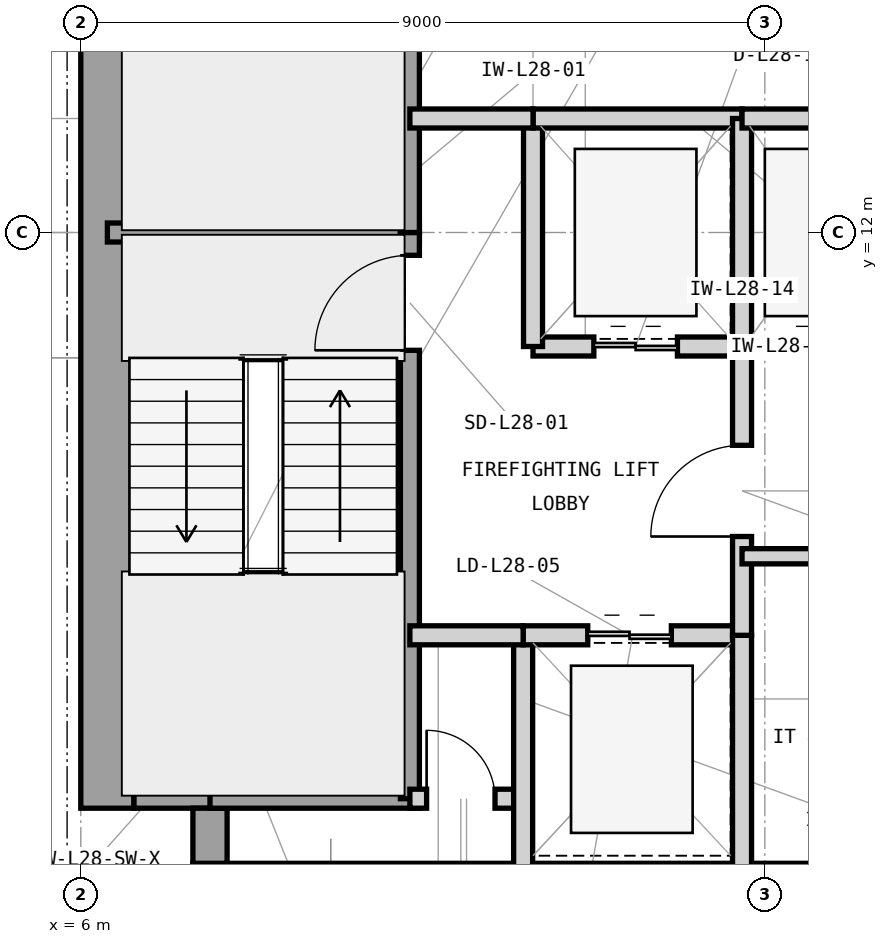
"""IFC4 building model, lengths in metres.
Left out: names, types, materials, properties, quantities, classifications, styles, units other than length and angle.
Written with IfcOpenShell. Run it as: python <this file> out.ifc"""

import sys

from ifc_helpers import new_model, si_unit, direction, frame, frame_2d, origin, place, context, subcontext, project, spatial, rectangle, extrude, element, fill, save


model = new_model("IFC4")
c1 = context("Model", 3, precision=1e-05, world=origin(), true_north=direction((0.0, 1.0)))
c2 = subcontext(c1, "Body", "Model", "MODEL_VIEW")
j1 = project(units=[si_unit("LENGTHUNIT", "METRE"), si_unit("PLANEANGLEUNIT", "RADIAN")], contexts=[c1])
p1 = place(None, origin())
s1 = spatial("IfcSite", under=j1, at=p1, CompositionType="ELEMENT")
p2 = place(p1, origin())
s2 = spatial("IfcBuilding", under=s1, at=p2, CompositionType="ELEMENT")
p3 = place(p2, frame((0.0, 0.0, 120.6)))
s3 = spatial("IfcBuildingStorey", under=s2, at=p3, CompositionType="ELEMENT", Elevation=120.6)
p4 = place(p3, frame((7.475, 3.35, 0.0), z_axis=(0.0, 0.0, 1.0), x_axis=(1.0, 0.0, 0.0)))
e1 = element("IfcWall", 1, at=p4, inside=s3, PredefinedType="SHEAR", context=c2, shape_type="SweptSolid", body=[
    extrude(rectangle(XDim=16.525, YDim=0.7, at=frame_2d((8.262, 0.0))), origin(), (0.0, 0.0, 1.0), 3.9),
])
p5 = place(p3, frame((6.35, 4.425, 0.0), z_axis=(0.0, 0.0, 1.0), x_axis=(0.0, 1.0, 0.0)))
e2 = element("IfcWall", 2, at=p5, inside=s3, PredefinedType="SHEAR", context=c2, shape_type="SweptSolid", body=[
    extrude(rectangle(XDim=15.15, YDim=0.7, at=frame_2d((7.575, 0.0))), origin(), (0.0, 0.0, 1.0), 3.9),
])
p6 = place(p3, frame((6.7, 4.65, 0.0), z_axis=(0.0, 0.0, 1.0), x_axis=(1.0, 0.0, 0.0)))
e3 = element("IfcWall", 3, at=p6, inside=s3, PredefinedType="SHEAR", context=c2, shape_type="SweptSolid", body=[
    extrude(rectangle(XDim=1.225, YDim=0.45, at=frame_2d((0.613, 0.0))), origin(), (0.0, 0.0, 1.0), 3.9),
])
p7 = place(p3, frame((7.7, 3.7, 0.0), z_axis=(0.0, 0.0, 1.0), x_axis=(0.0, 1.0, 0.0)))
e4 = element("IfcWall", 4, at=p7, inside=s3, PredefinedType="SHEAR", context=c2, shape_type="SweptSolid", body=[
    extrude(rectangle(XDim=0.725, YDim=0.45, at=frame_2d((0.363, 0.0))), origin(), (0.0, 0.0, 1.0), 3.9),
])
p8 = place(p3, frame((6.35, 12.0, 0.0), z_axis=(0.0, 0.0, 1.0), x_axis=(1.0, 0.0, 0.0)))
e5 = element("IfcWall", 5, at=p8, inside=s3, PredefinedType="SHEAR", context=c2, shape_type="SweptSolid", body=[
    extrude(rectangle(XDim=4.105, YDim=0.25, at=frame_2d((2.052, 0.0))), origin(), (0.0, 0.0, 1.0), 3.9),
])
p9 = place(p3, frame((7.7, 4.55, 0.0), z_axis=(0.0, 0.0, 1.0), x_axis=(1.0, 0.0, 0.0)))
e6 = element("IfcWall", 6, at=p9, inside=s3, PredefinedType="SHEAR", context=c2, shape_type="SweptSolid", body=[
    extrude(rectangle(XDim=2.755, YDim=0.25, at=frame_2d((1.377, 0.0))), origin(), (0.0, 0.0, 1.0), 3.9),
])
p10 = place(p3, frame((10.33, 4.55, 0.0), z_axis=(0.0, 0.0, 1.0), x_axis=(0.0, 1.0, 0.0)))
e7 = element("IfcWall", 7, at=p10, inside=s3, PredefinedType="SHEAR", context=c2, shape_type="SweptSolid", body=[
    extrude(rectangle(XDim=7.45, YDim=0.25, at=frame_2d((3.725, 0.0))), origin(), (0.0, 0.0, 1.0), 3.9),
])
p11 = place(p10, frame((5.9, 0.0, 0.0)))
e8 = element("IfcOpeningElement", 8, at=p11, cuts=e7, PredefinedType="OPENING", context=c2, shape_type="SweptSolid", body=[
    extrude(rectangle(XDim=1.25, YDim=2.2, at=frame_2d((0.625, 1.1))), frame((0.0, 0.135, 0.0), z_axis=(0.0, -1.0, 0.0), x_axis=(1.0, 0.0, 0.0)), (0.0, 0.0, 1.0), 0.27),
])
p12 = place(p3, frame((10.33, 12.0, 0.0), z_axis=(0.0, 0.0, 1.0), x_axis=(0.0, 1.0, 0.0)))
e9 = element("IfcWall", 9, at=p12, inside=s3, PredefinedType="SHEAR", context=c2, shape_type="SweptSolid", body=[
    extrude(rectangle(XDim=7.45, YDim=0.25, at=frame_2d((3.725, 0.0))), origin(), (0.0, 0.0, 1.0), 3.9),
])
p13 = place(p12, frame((5.85, 0.0, 0.0)))
e10 = element("IfcOpeningElement", 10, at=p13, cuts=e9, PredefinedType="OPENING", context=c2, shape_type="SweptSolid", body=[
    extrude(rectangle(XDim=1.25, YDim=2.2, at=frame_2d((0.625, 1.1))), frame((0.0, 0.135, 0.0), z_axis=(0.0, -1.0, 0.0), x_axis=(1.0, 0.0, 0.0)), (0.0, 0.0, 1.0), 0.27),
])
p14 = place(p3, frame((10.33, 4.55, 0.0), z_axis=(0.0, 0.0, 1.0), x_axis=(1.0, 0.0, 0.0)))
e11 = element("IfcWall", 11, at=p14, inside=s3, PredefinedType="PARTITIONING", context=c2, shape_type="SweptSolid", body=[
    extrude(rectangle(XDim=1.49, YDim=0.25, at=frame_2d((0.745, 0.0))), origin(), (0.0, 0.0, 1.0), 3.69),
])
p15 = place(p14, frame((0.22, 0.0, 0.0)))
e12 = element("IfcOpeningElement", 12, at=p15, cuts=e11, PredefinedType="OPENING", context=c2, shape_type="SweptSolid", body=[
    extrude(rectangle(XDim=0.9, YDim=2.1, at=frame_2d((0.45, 1.05))), frame((0.0, 0.135, 0.0), z_axis=(0.0, -1.0, 0.0), x_axis=(1.0, 0.0, 0.0)), (0.0, 0.0, 1.0), 0.27),
])
p16 = place(p3, frame((11.82, 3.35, 0.0), z_axis=(0.0, 0.0, 1.0), x_axis=(0.0, 1.0, 0.0)))
e13 = element("IfcWall", 13, at=p16, inside=s3, PredefinedType="PARTITIONING", context=c2, shape_type="SweptSolid", body=[
    extrude(rectangle(XDim=3.35, YDim=0.25, at=frame_2d((1.675, 0.0))), origin(), (0.0, 0.0, 1.0), 3.69),
])
p17 = place(p3, frame((11.82, 6.7, 0.0), z_axis=(0.0, 0.0, 1.0), x_axis=(1.0, 0.0, 0.0)))
e14 = element("IfcWall", 14, at=p17, inside=s3, PredefinedType="PARTITIONING", context=c2, shape_type="SweptSolid", body=[
    extrude(rectangle(XDim=2.88, YDim=0.25, at=frame_2d((1.44, 0.0))), origin(), (0.0, 0.0, 1.0), 3.227),
])
p18 = place(p17, frame((0.85, 0.0, 0.0)))
e15 = element("IfcOpeningElement", 15, at=p18, cuts=e14, PredefinedType="OPENING", context=c2, shape_type="SweptSolid", body=[
    extrude(rectangle(XDim=1.1, YDim=2.25, at=frame_2d((0.55, 1.125))), frame((0.0, 0.135, 0.0), z_axis=(0.0, -1.0, 0.0), x_axis=(1.0, 0.0, 0.0)), (0.0, 0.0, 1.0), 0.27),
])
p19 = place(p3, frame((14.7, 3.35, 0.0), z_axis=(0.0, 0.0, 1.0), x_axis=(0.0, 1.0, 0.0)))
e16 = element("IfcWall", 16, at=p19, inside=s3, PredefinedType="PARTITIONING", context=c2, shape_type="SweptSolid", body=[
    extrude(rectangle(XDim=3.35, YDim=0.25, at=frame_2d((1.675, 0.0))), origin(), (0.0, 0.0, 1.0), 3.69),
])
p20 = place(p3, frame((11.95, 10.5, 0.0), z_axis=(0.0, 0.0, 1.0), x_axis=(1.0, 0.0, 0.0)))
e17 = element("IfcWall", 17, at=p20, inside=s3, PredefinedType="PARTITIONING", context=c2, shape_type="SweptSolid", body=[
    extrude(rectangle(XDim=2.75, YDim=0.25, at=frame_2d((1.375, 0.0))), origin(), (0.0, 0.0, 1.0), 3.227),
])
p21 = place(p20, frame((0.8, 0.0, 0.0)))
e18 = element("IfcOpeningElement", 18, at=p21, cuts=e17, PredefinedType="OPENING", context=c2, shape_type="SweptSolid", body=[
    extrude(rectangle(XDim=1.1, YDim=2.25, at=frame_2d((0.55, 1.125))), frame((0.0, 0.135, 0.0), z_axis=(0.0, -1.0, 0.0), x_axis=(1.0, 0.0, 0.0)), (0.0, 0.0, 1.0), 0.27),
])
p22 = place(p3, frame((11.95, 10.5, 0.0), z_axis=(0.0, 0.0, 1.0), x_axis=(0.0, 1.0, 0.0)))
e19 = element("IfcWall", 19, at=p22, inside=s3, PredefinedType="PARTITIONING", context=c2, shape_type="SweptSolid", body=[
    extrude(rectangle(XDim=3.0, YDim=0.25, at=frame_2d((1.5, 0.0))), origin(), (0.0, 0.0, 1.0), 3.69),
])
p23 = place(p3, frame((11.95, 13.5, 0.0), z_axis=(0.0, 0.0, 1.0), x_axis=(1.0, 0.0, 0.0)))
e20 = element("IfcWall", 20, at=p23, inside=s3, PredefinedType="PARTITIONING", context=c2, shape_type="SweptSolid", body=[
    extrude(rectangle(XDim=2.75, YDim=0.25, at=frame_2d((1.375, 0.0))), origin(), (0.0, 0.0, 1.0), 3.227),
])
p24 = place(p3, frame((14.7, 10.5, 0.0), z_axis=(0.0, 0.0, 1.0), x_axis=(0.0, 1.0, 0.0)))
e21 = element("IfcWall", 21, at=p24, inside=s3, PredefinedType="PARTITIONING", context=c2, shape_type="SweptSolid", body=[
    extrude(rectangle(XDim=3.0, YDim=0.25, at=frame_2d((1.5, 0.0))), origin(), (0.0, 0.0, 1.0), 3.69),
])
p25 = place(p3, frame((14.7, 6.7, 0.0), z_axis=(0.0, 0.0, 1.0), x_axis=(0.0, 1.0, 0.0)))
e22 = element("IfcWall", 22, at=p25, inside=s3, PredefinedType="PARTITIONING", context=c2, shape_type="SweptSolid", body=[
    extrude(rectangle(XDim=3.8, YDim=0.25, at=frame_2d((1.9, 0.0))), origin(), (0.0, 0.0, 1.0), 3.69),
])
p26 = place(p25, frame((1.3, 0.0, 0.0)))
e23 = element("IfcOpeningElement", 23, at=p26, cuts=e22, PredefinedType="OPENING", context=c2, shape_type="SweptSolid", body=[
    extrude(rectangle(XDim=1.2, YDim=2.2, at=frame_2d((0.6, 1.1))), frame((0.0, 0.135, 0.0), z_axis=(0.0, -1.0, 0.0), x_axis=(1.0, 0.0, 0.0)), (0.0, 0.0, 1.0), 0.27),
])
p27 = place(p3, frame((10.33, 13.5, 0.0), z_axis=(0.0, 0.0, 1.0), x_axis=(1.0, 0.0, 0.0)))
e24 = element("IfcWall", 24, at=p27, inside=s3, PredefinedType="PARTITIONING", context=c2, shape_type="SweptSolid", body=[
    extrude(rectangle(XDim=1.62, YDim=0.25, at=frame_2d((0.81, 0.0))), origin(), (0.0, 0.0, 1.0), 3.227),
])
p28 = place(p3, frame((10.33, 6.7, 0.0), z_axis=(0.0, 0.0, 1.0), x_axis=(1.0, 0.0, 0.0)))
e25 = element("IfcWall", 25, at=p28, inside=s3, PredefinedType="PARTITIONING", context=c2, shape_type="SweptSolid", body=[
    extrude(rectangle(XDim=1.49, YDim=0.25, at=frame_2d((0.745, 0.0))), origin(), (0.0, 0.0, 1.0), 3.227),
])
p29 = place(p3, frame((14.7, 7.74, 0.0), z_axis=(0.0, 0.0, 1.0), x_axis=(1.0, 0.0, 0.0)))
e26 = element("IfcWall", 26, at=p29, inside=s3, PredefinedType="PARTITIONING", context=c2, shape_type="SweptSolid", body=[
    extrude(rectangle(XDim=2.95, YDim=0.2, at=frame_2d((1.475, 0.0))), origin(), (0.0, 0.0, 1.0), 3.69),
])
p30 = place(p29, frame((1.025, 0.0, 0.0)))
e27 = element("IfcOpeningElement", 27, at=p30, cuts=e26, PredefinedType="OPENING", context=c2, shape_type="SweptSolid", body=[
    extrude(rectangle(XDim=0.9, YDim=2.1, at=frame_2d((0.45, 1.05))), frame((0.0, 0.11, 0.0), z_axis=(0.0, -1.0, 0.0), x_axis=(1.0, 0.0, 0.0)), (0.0, 0.0, 1.0), 0.22),
])
p31 = place(p3, frame((14.7, 10.5, 0.0), z_axis=(0.0, 0.0, 1.0), x_axis=(1.0, 0.0, 0.0)))
e28 = element("IfcWall", 28, at=p31, inside=s3, PredefinedType="PARTITIONING", context=c2, shape_type="SweptSolid", body=[
    extrude(rectangle(XDim=2.15, YDim=0.25, at=frame_2d((1.075, 0.0))), origin(), (0.0, 0.0, 1.0), 3.227),
])
p32 = place(p31, frame((0.48, 0.0, 0.0)))
e29 = element("IfcOpeningElement", 29, at=p32, cuts=e28, PredefinedType="OPENING", context=c2, shape_type="SweptSolid", body=[
    extrude(rectangle(XDim=1.15, YDim=2.25, at=frame_2d((0.575, 1.125))), frame((0.0, 0.135, 0.0), z_axis=(0.0, -1.0, 0.0), x_axis=(1.0, 0.0, 0.0)), (0.0, 0.0, 1.0), 0.27),
])
p33 = place(p3, frame((14.7, 13.5, 0.0), z_axis=(0.0, 0.0, 1.0), x_axis=(1.0, 0.0, 0.0)))
e30 = element("IfcWall", 30, at=p33, inside=s3, PredefinedType="PARTITIONING", context=c2, shape_type="SweptSolid", body=[
    extrude(rectangle(XDim=8.95, YDim=0.25, at=frame_2d((4.475, 0.0))), origin(), (0.0, 0.0, 1.0), 3.227),
])
p34 = place(p11, origin())
e31 = element("IfcDoor", 31, at=p34, inside=s3, OperationType="SINGLE_SWING_LEFT", PredefinedType="DOOR", context=c2, shape_type="SweptSolid", body=[
    extrude(rectangle(XDim=1.25, YDim=2.2, at=frame_2d((0.625, 1.1))), frame((0.0, 0.025, 0.0), z_axis=(0.0, -1.0, 0.0), x_axis=(1.0, 0.0, 0.0)), (0.0, 0.0, 1.0), 0.05),
])
fill(e8, e31)
p35 = place(p15, origin())
e32 = element("IfcDoor", 32, at=p35, inside=s3, OperationType="SINGLE_SWING_LEFT", PredefinedType="TRAPDOOR", context=c2, shape_type="SweptSolid", body=[
    extrude(rectangle(XDim=0.9, YDim=2.1, at=frame_2d((0.45, 1.05))), frame((0.0, 0.025, 0.0), z_axis=(0.0, -1.0, 0.0), x_axis=(1.0, 0.0, 0.0)), (0.0, 0.0, 1.0), 0.05),
])
fill(e12, e32)
p36 = place(p18, origin())
e33 = element("IfcDoor", 33, at=p36, inside=s3, OperationType="DOUBLE_DOOR_SLIDING", PredefinedType="DOOR", context=c2, shape_type="SweptSolid", body=[
    extrude(rectangle(XDim=1.1, YDim=2.25, at=frame_2d((0.55, 1.125))), frame((0.0, 0.025, 0.0), z_axis=(0.0, -1.0, 0.0), x_axis=(1.0, 0.0, 0.0)), (0.0, 0.0, 1.0), 0.05),
])
fill(e15, e33)
p37 = place(p21, origin())
e34 = element("IfcDoor", 34, at=p37, inside=s3, OperationType="DOUBLE_DOOR_SLIDING", PredefinedType="DOOR", context=c2, shape_type="SweptSolid", body=[
    extrude(rectangle(XDim=1.1, YDim=2.25, at=frame_2d((0.55, 1.125))), frame((0.0, 0.025, 0.0), z_axis=(0.0, -1.0, 0.0), x_axis=(1.0, 0.0, 0.0)), (0.0, 0.0, 1.0), 0.05),
])
fill(e18, e34)
p38 = place(p26, origin())
e35 = element("IfcDoor", 35, at=p38, inside=s3, OperationType="SINGLE_SWING_LEFT", PredefinedType="DOOR", context=c2, shape_type="SweptSolid", body=[
    extrude(rectangle(XDim=1.2, YDim=2.2, at=frame_2d((0.6, 1.1))), frame((0.0, 0.025, 0.0), z_axis=(0.0, -1.0, 0.0), x_axis=(1.0, 0.0, 0.0)), (0.0, 0.0, 1.0), 0.05),
])
fill(e23, e35)
p39 = place(p32, origin())
e36 = element("IfcDoor", 36, at=p39, inside=s3, OperationType="DOUBLE_DOOR_SLIDING", PredefinedType="DOOR", context=c2, shape_type="SweptSolid", body=[
    extrude(rectangle(XDim=1.15, YDim=2.25, at=frame_2d((0.575, 1.125))), frame((0.0, 0.025, 0.0), z_axis=(0.0, -1.0, 0.0), x_axis=(1.0, 0.0, 0.0)), (0.0, 0.0, 1.0), 0.05),
])
fill(e29, e36)
save(model, sys.argv[1])
